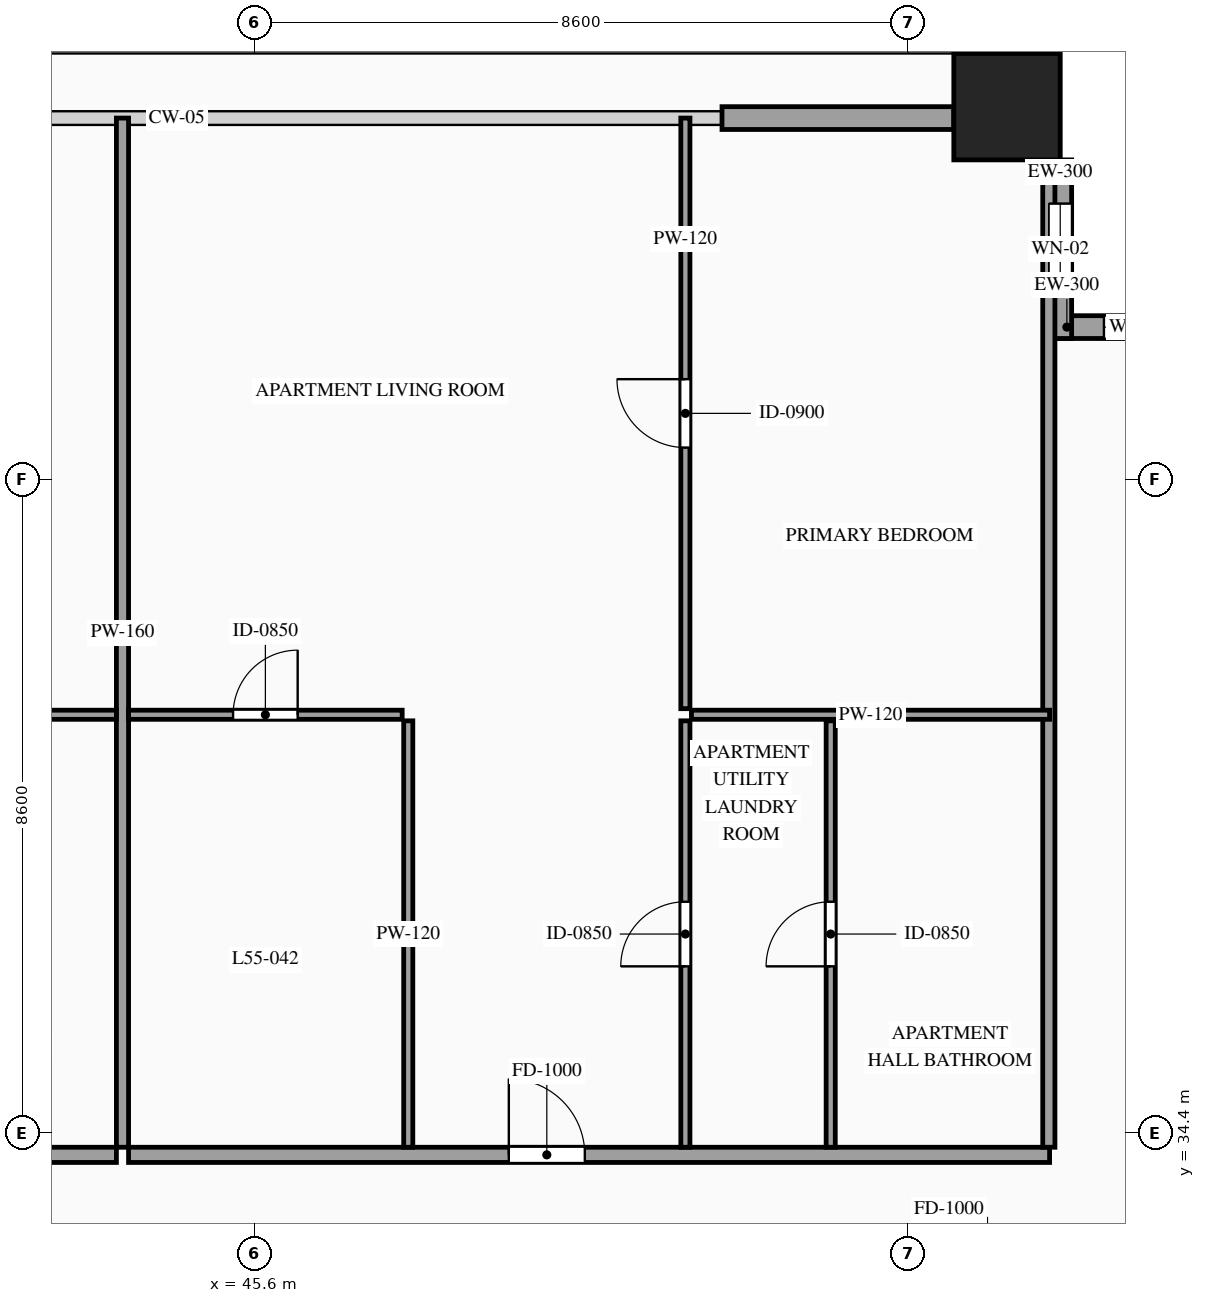
"""IFC4 building model, lengths in metres.
Left out: names, types, materials, properties, quantities, classifications, styles, units other than length and angle.
Written with IfcOpenShell. Run it as: python <this file> out.ifc"""

import sys

from ifc_helpers import new_model, si_unit, direction, frame, frame_2d, origin, origin_2d, place, context, subcontext, project, spatial, rectangle, hollow_rectangle, extrude, source, transform, mapped, element, fill, save


model = new_model("IFC4")
c1 = context("Model", 3, precision=1e-05, world=origin(), true_north=direction((0.0, 1.0)))
c2 = subcontext(c1, "Body", "Model", "MODEL_VIEW")
j1 = project(units=[si_unit("LENGTHUNIT", "METRE"), si_unit("PLANEANGLEUNIT", "RADIAN")], contexts=[c1])
p1 = place(None, origin())
s1 = spatial("IfcSite", under=j1, at=p1, CompositionType="ELEMENT")
p2 = place(p1, origin())
s2 = spatial("IfcBuilding", under=s1, at=p2, CompositionType="ELEMENT")
p3 = place(p2, frame((0.0, 0.0, 209.0)))
s3 = spatial("IfcBuildingStorey", under=s2, at=p3, CompositionType="ELEMENT", Elevation=209.0)
m1 = source(origin(), c2, "Body", "SweptSolid", [
    extrude(hollow_rectangle(XDim=1.4, YDim=1.4, WallThickness=0.06, at=origin_2d()), origin(), (0.0, 0.0, 1.0), 3.5),
])
p4 = place(p3, frame((55.5, 47.9, 0.0), z_axis=(0.0, 0.0, 1.0), x_axis=(1.0, 0.0, 0.0)))
e1 = element("IfcColumn", 1, at=p4, inside=s3, PredefinedType="COLUMN", context=c2, shape_type="MappedRepresentation", body=[
    mapped(m1, transform((0.0, 0.0, 0.0), scale=1.0)),
])
p5 = place(p3, frame((58.4, 45.0, 0.0), z_axis=(0.0, 0.0, 1.0), x_axis=(-1.0, 0.0, 0.0)))
e2 = element("IfcWall", 2, at=p5, inside=s3, PredefinedType="SOLIDWALL", context=c2, shape_type="SweptSolid", body=[
    extrude(rectangle(XDim=2.35, YDim=0.3, at=frame_2d((1.175, 0.0))), origin(), (0.0, 0.0, 1.0), 3.28),
])
p6 = place(p5, frame((0.725, 0.0, 0.85)))
e3 = element("IfcOpeningElement", 3, at=p6, cuts=e2, PredefinedType="OPENING", context=c2, shape_type="SweptSolid", body=[
    extrude(rectangle(XDim=0.9, YDim=1.5, at=frame_2d((0.45, 0.75))), frame((0.0, 0.165, 0.0), z_axis=(0.0, -1.0, 0.0), x_axis=(1.0, 0.0, 0.0)), (0.0, 0.0, 1.0), 0.33),
])
p7 = place(p3, frame((56.2, 44.85, 0.0), z_axis=(0.0, 0.0, 1.0), x_axis=(0.0, 1.0, 0.0)))
e4 = element("IfcWall", 4, at=p7, inside=s3, PredefinedType="SOLIDWALL", context=c2, shape_type="SweptSolid", body=[
    extrude(rectangle(XDim=2.35, YDim=0.3, at=frame_2d((1.175, 0.0))), origin(), (0.0, 0.0, 1.0), 3.28),
])
p8 = place(p7, frame((0.575, 0.0, 0.85)))
e5 = element("IfcOpeningElement", 5, at=p8, cuts=e4, PredefinedType="OPENING", context=c2, shape_type="SweptSolid", body=[
    extrude(rectangle(XDim=1.2, YDim=2.1, at=frame_2d((0.6, 1.05))), frame((0.0, 0.165, 0.0), z_axis=(0.0, -1.0, 0.0), x_axis=(1.0, 0.0, 0.0)), (0.0, 0.0, 1.0), 0.33),
])
m2 = source(origin(), c2, "Body", "SweptSolid", [
    extrude(rectangle(XDim=3.05, YDim=0.3, at=frame_2d((1.525, 0.0))), origin(), (0.0, 0.0, 1.0), 2.835),
])
p9 = place(p3, frame((51.75, 47.75, 0.0), z_axis=(0.0, 0.0, 1.0), x_axis=(1.0, 0.0, 0.0)))
e6 = element("IfcWall", 6, at=p9, inside=s3, PredefinedType="SOLIDWALL", context=c2, shape_type="MappedRepresentation", body=[
    mapped(m2, transform((0.0, 0.0, 0.0), scale=1.0)),
])
p10 = place(p3, frame((30.981, 34.11, 0.0), z_axis=(0.0, 0.0, 1.0), x_axis=(1.0, 0.0, 0.0)))
e7 = element("IfcWall", 7, at=p10, inside=s3, PredefinedType="PARTITIONING", context=c2, shape_type="SweptSolid", body=[
    extrude(rectangle(XDim=12.801, YDim=0.2, at=frame_2d((6.4, 0.0))), origin(), (0.0, 0.0, 1.0), 3.28),
])
p11 = place(p10, frame((5.344, 0.0, 0.0)))
e8 = element("IfcOpeningElement", 8, at=p11, cuts=e7, PredefinedType="OPENING", context=c2, shape_type="SweptSolid", body=[
    extrude(rectangle(XDim=1.0, YDim=2.2, at=frame_2d((0.5, 1.1))), frame((0.0, 0.115, 0.0), z_axis=(0.0, -1.0, 0.0), x_axis=(1.0, 0.0, 0.0)), (0.0, 0.0, 1.0), 0.23),
])
m3 = source(origin(), c2, "Body", "SweptSolid", [
    extrude(rectangle(XDim=13.54, YDim=0.16, at=frame_2d((6.77, 0.0))), origin(), (0.0, 0.0, 1.0), 3.28),
])
p12 = place(p3, frame((43.862, 34.21, 0.0), z_axis=(0.0, 0.0, 1.0), x_axis=(0.0, 1.0, 0.0)))
e9 = element("IfcWall", 9, at=p12, inside=s3, PredefinedType="PARTITIONING", context=c2, shape_type="MappedRepresentation", body=[
    mapped(m3, transform((0.0, 0.0, 0.0), scale=1.0)),
])
m4 = source(origin(), c2, "Body", "SweptSolid", [
    extrude(rectangle(XDim=4.712, YDim=0.12, at=frame_2d((2.356, 0.0))), origin(), (0.0, 0.0, 1.0), 2.875),
])
p13 = place(p3, frame((39.07, 39.9, 0.0), z_axis=(0.0, 0.0, 1.0), x_axis=(1.0, 0.0, 0.0)))
e10 = element("IfcWall", 10, at=p13, inside=s3, PredefinedType="PARTITIONING", context=c2, shape_type="MappedRepresentation", body=[
    mapped(m4, transform((0.0, 0.0, 0.0), scale=1.0)),
])
p14 = place(p3, frame((43.942, 34.11, 0.0), z_axis=(0.0, 0.0, 1.0), x_axis=(1.0, 0.0, 0.0)))
e11 = element("IfcWall", 11, at=p14, inside=s3, PredefinedType="PARTITIONING", context=c2, shape_type="SweptSolid", body=[
    extrude(rectangle(XDim=12.118, YDim=0.2, at=frame_2d((6.059, 0.0))), origin(), (0.0, 0.0, 1.0), 3.28),
])
p15 = place(p14, frame((5.003, 0.0, 0.0)))
e12 = element("IfcOpeningElement", 12, at=p15, cuts=e11, PredefinedType="OPENING", context=c2, shape_type="SweptSolid", body=[
    extrude(rectangle(XDim=1.0, YDim=2.2, at=frame_2d((0.5, 1.1))), frame((0.0, 0.115, 0.0), z_axis=(0.0, -1.0, 0.0), x_axis=(1.0, 0.0, 0.0)), (0.0, 0.0, 1.0), 0.23),
])
m5 = source(origin(), c2, "Body", "SweptSolid", [
    extrude(rectangle(XDim=13.39, YDim=0.16, at=frame_2d((6.695, 0.0))), origin(), (0.0, 0.0, 1.0), 3.28),
])
p16 = place(p3, frame((56.05, 34.21, 0.0), z_axis=(0.0, 0.0, 1.0), x_axis=(0.0, 1.0, 0.0)))
e13 = element("IfcWall", 13, at=p16, inside=s3, PredefinedType="PARTITIONING", context=c2, shape_type="MappedRepresentation", body=[
    mapped(m5, transform((0.0, 0.0, 0.0), scale=1.0)),
])
p17 = place(p3, frame((43.942, 39.9, 0.0), z_axis=(0.0, 0.0, 1.0), x_axis=(1.0, 0.0, 0.0)))
e14 = element("IfcWall", 14, at=p17, inside=s3, PredefinedType="PARTITIONING", context=c2, shape_type="SweptSolid", body=[
    extrude(rectangle(XDim=3.6, YDim=0.12, at=frame_2d((1.8, 0.0))), origin(), (0.0, 0.0, 1.0), 2.875),
])
p18 = place(p17, frame((1.375, 0.0, 0.0)))
e15 = element("IfcOpeningElement", 15, at=p18, cuts=e14, PredefinedType="OPENING", context=c2, shape_type="SweptSolid", body=[
    extrude(rectangle(XDim=0.85, YDim=2.1, at=frame_2d((0.425, 1.05))), frame((0.0, 0.075, 0.0), z_axis=(0.0, -1.0, 0.0), x_axis=(1.0, 0.0, 0.0)), (0.0, 0.0, 1.0), 0.15),
])
m6 = source(origin(), c2, "Body", "SweptSolid", [
    extrude(rectangle(XDim=5.61, YDim=0.12, at=frame_2d((2.805, 0.0))), origin(), (0.0, 0.0, 1.0), 3.28),
])
p19 = place(p3, frame((47.622, 34.21, 0.0), z_axis=(0.0, 0.0, 1.0), x_axis=(0.0, 1.0, 0.0)))
e16 = element("IfcWall", 16, at=p19, inside=s3, PredefinedType="PARTITIONING", context=c2, shape_type="MappedRepresentation", body=[
    mapped(m6, transform((0.0, 0.0, 0.0), scale=1.0)),
])
p20 = place(p3, frame((53.18, 34.21, 0.0), z_axis=(0.0, 0.0, 1.0), x_axis=(0.0, 1.0, 0.0)))
e17 = element("IfcWall", 17, at=p20, inside=s3, PredefinedType="PARTITIONING", context=c2, shape_type="SweptSolid", body=[
    extrude(rectangle(XDim=5.61, YDim=0.12, at=frame_2d((2.805, 0.0))), origin(), (0.0, 0.0, 1.0), 3.28),
])
p21 = place(p20, frame((2.38, 0.0, 0.0)))
e18 = element("IfcOpeningElement", 18, at=p21, cuts=e17, PredefinedType="OPENING", context=c2, shape_type="SweptSolid", body=[
    extrude(rectangle(XDim=0.85, YDim=2.1, at=frame_2d((0.425, 1.05))), frame((0.0, 0.075, 0.0), z_axis=(0.0, -1.0, 0.0), x_axis=(1.0, 0.0, 0.0)), (0.0, 0.0, 1.0), 0.15),
])
m7 = source(origin(), c2, "Body", "SweptSolid", [
    extrude(rectangle(XDim=4.712, YDim=0.12, at=frame_2d((2.356, 0.0))), origin(), (0.0, 0.0, 1.0), 3.28),
])
p22 = place(p3, frame((51.348, 39.9, 0.0), z_axis=(0.0, 0.0, 1.0), x_axis=(1.0, 0.0, 0.0)))
e19 = element("IfcWall", 19, at=p22, inside=s3, PredefinedType="PARTITIONING", context=c2, shape_type="MappedRepresentation", body=[
    mapped(m7, transform((0.0, 0.0, 0.0), scale=1.0)),
])
p23 = place(p3, frame((51.268, 39.98, 0.0), z_axis=(0.0, 0.0, 1.0), x_axis=(0.0, 1.0, 0.0)))
e20 = element("IfcWall", 20, at=p23, inside=s3, PredefinedType="PARTITIONING", context=c2, shape_type="SweptSolid", body=[
    extrude(rectangle(XDim=7.77, YDim=0.12, at=frame_2d((3.885, 0.0))), origin(), (0.0, 0.0, 1.0), 3.28),
])
p24 = place(p23, frame((3.435, 0.0, 0.0)))
e21 = element("IfcOpeningElement", 21, at=p24, cuts=e20, PredefinedType="OPENING", context=c2, shape_type="SweptSolid", body=[
    extrude(rectangle(XDim=0.9, YDim=2.15, at=frame_2d((0.45, 1.075))), frame((0.0, 0.075, 0.0), z_axis=(0.0, -1.0, 0.0), x_axis=(1.0, 0.0, 0.0)), (0.0, 0.0, 1.0), 0.15),
])
p25 = place(p3, frame((51.268, 34.21, 0.0), z_axis=(0.0, 0.0, 1.0), x_axis=(0.0, 1.0, 0.0)))
e22 = element("IfcWall", 22, at=p25, inside=s3, PredefinedType="PARTITIONING", context=c2, shape_type="SweptSolid", body=[
    extrude(rectangle(XDim=5.61, YDim=0.12, at=frame_2d((2.805, 0.0))), origin(), (0.0, 0.0, 1.0), 3.28),
])
p26 = place(p25, frame((2.38, 0.0, 0.0)))
e23 = element("IfcOpeningElement", 23, at=p26, cuts=e22, PredefinedType="OPENING", context=c2, shape_type="SweptSolid", body=[
    extrude(rectangle(XDim=0.85, YDim=2.1, at=frame_2d((0.425, 1.05))), frame((0.0, 0.075, 0.0), z_axis=(0.0, -1.0, 0.0), x_axis=(1.0, 0.0, 0.0)), (0.0, 0.0, 1.0), 0.15),
])
m8 = source(origin(), c2, "Body", "SweptSolid", [
    extrude(rectangle(XDim=0.9, YDim=1.5, at=frame_2d((0.45, 0.75))), frame((0.0, 0.03, 0.0), z_axis=(0.0, -1.0, 0.0), x_axis=(1.0, 0.0, 0.0)), (0.0, 0.0, 1.0), 0.06),
])
p27 = place(p6, origin())
e24 = element("IfcWindow", 24, at=p27, inside=s3, PartitioningType="SINGLE_PANEL", PredefinedType="WINDOW", context=c2, shape_type="MappedRepresentation", body=[
    mapped(m8, transform((0.0, 0.0, 0.0), scale=1.0)),
])
fill(e3, e24)
m9 = source(origin(), c2, "Body", "SweptSolid", [
    extrude(rectangle(XDim=1.2, YDim=2.1, at=frame_2d((0.6, 1.05))), frame((0.0, 0.03, 0.0), z_axis=(0.0, -1.0, 0.0), x_axis=(1.0, 0.0, 0.0)), (0.0, 0.0, 1.0), 0.06),
])
p28 = place(p8, origin())
e25 = element("IfcWindow", 25, at=p28, inside=s3, PartitioningType="SINGLE_PANEL", PredefinedType="WINDOW", context=c2, shape_type="MappedRepresentation", body=[
    mapped(m9, transform((0.0, 0.0, 0.0), scale=1.0)),
])
fill(e5, e25)
m10 = source(origin(), c2, "Body", "SweptSolid", [
    extrude(rectangle(XDim=1.0, YDim=2.2, at=frame_2d((0.5, 1.1))), frame((0.0, 0.025, 0.0), z_axis=(0.0, -1.0, 0.0), x_axis=(1.0, 0.0, 0.0)), (0.0, 0.0, 1.0), 0.05),
])
p29 = place(p15, origin())
e26 = element("IfcDoor", 26, at=p29, inside=s3, OperationType="SINGLE_SWING_LEFT", PredefinedType="DOOR", context=c2, shape_type="MappedRepresentation", body=[
    mapped(m10, transform((0.0, 0.0, 0.0), scale=1.0)),
])
fill(e12, e26)
m11 = source(origin(), c2, "Body", "SweptSolid", [
    extrude(rectangle(XDim=0.85, YDim=2.1, at=frame_2d((0.425, 1.05))), frame((0.0, 0.025, 0.0), z_axis=(0.0, -1.0, 0.0), x_axis=(1.0, 0.0, 0.0)), (0.0, 0.0, 1.0), 0.05),
])
p30 = place(p18, origin())
e27 = element("IfcDoor", 27, at=p30, inside=s3, OperationType="SINGLE_SWING_RIGHT", PredefinedType="DOOR", context=c2, shape_type="MappedRepresentation", body=[
    mapped(m11, transform((0.0, 0.0, 0.0), scale=1.0)),
])
fill(e15, e27)
p31 = place(p21, origin())
e28 = element("IfcDoor", 28, at=p31, inside=s3, OperationType="SINGLE_SWING_LEFT", PredefinedType="DOOR", context=c2, shape_type="MappedRepresentation", body=[
    mapped(m11, transform((0.0, 0.0, 0.0), scale=1.0)),
])
fill(e18, e28)
m12 = source(origin(), c2, "Body", "SweptSolid", [
    extrude(rectangle(XDim=0.9, YDim=2.15, at=frame_2d((0.45, 1.075))), frame((0.0, 0.025, 0.0), z_axis=(0.0, -1.0, 0.0), x_axis=(1.0, 0.0, 0.0)), (0.0, 0.0, 1.0), 0.05),
])
p32 = place(p24, origin())
e29 = element("IfcDoor", 29, at=p32, inside=s3, OperationType="SINGLE_SWING_RIGHT", PredefinedType="DOOR", context=c2, shape_type="MappedRepresentation", body=[
    mapped(m12, transform((0.0, 0.0, 0.0), scale=1.0)),
])
fill(e21, e29)
p33 = place(p26, origin())
e30 = element("IfcDoor", 30, at=p33, inside=s3, OperationType="SINGLE_SWING_LEFT", PredefinedType="DOOR", context=c2, shape_type="MappedRepresentation", body=[
    mapped(m11, transform((0.0, 0.0, 0.0), scale=1.0)),
])
fill(e23, e30)
save(model, sys.argv[1])
